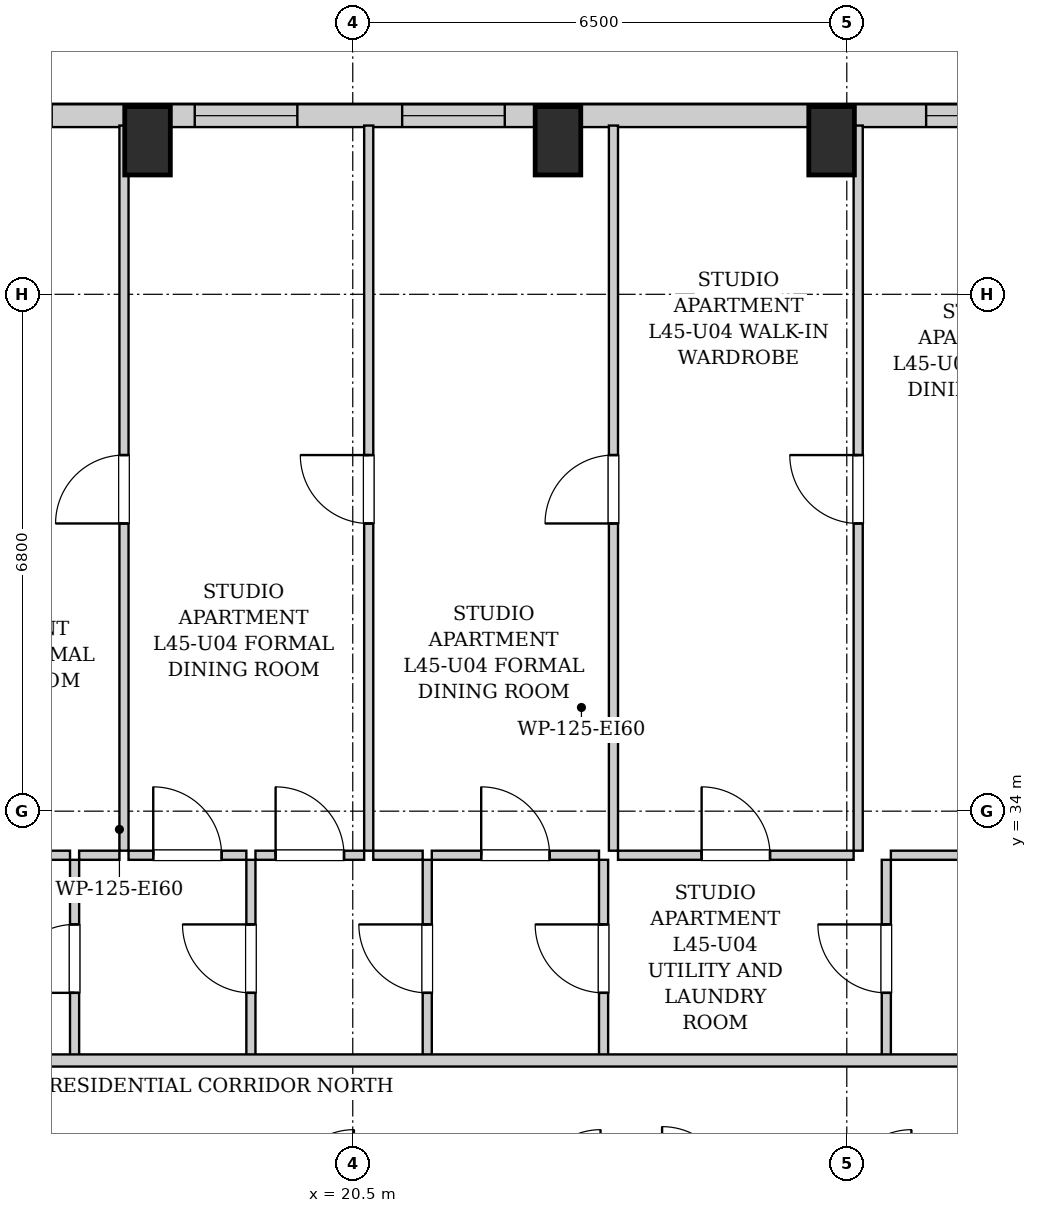
"""IFC4 building model, lengths in metres.
Left out: names, types, materials, properties, quantities, classifications, styles, units other than length and angle.
Written with IfcOpenShell. Run it as: python <this file> out.ifc"""

import sys

from ifc_helpers import new_model, si_unit, direction, frame, frame_2d, origin, origin_2d, place, context, subcontext, project, spatial, rectangle, extrude, element, fill, save


model = new_model("IFC4")
c1 = context("Model", 3, precision=1e-05, world=origin(), true_north=direction((0.0, 1.0)))
c2 = subcontext(c1, "Body", "Model", "MODEL_VIEW")
j1 = project(units=[si_unit("LENGTHUNIT", "METRE"), si_unit("PLANEANGLEUNIT", "RADIAN")], contexts=[c1])
p1 = place(None, origin())
s1 = spatial("IfcSite", under=j1, at=p1, CompositionType="ELEMENT")
p2 = place(p1, origin())
s2 = spatial("IfcBuilding", under=s1, at=p2, CompositionType="ELEMENT")
p3 = place(p2, frame((0.0, 0.0, 156.9)))
s3 = spatial("IfcBuildingStorey", under=s2, at=p3, CompositionType="ELEMENT", Elevation=156.9)
for number, where, z_axis, x_axis in (
    (1, (17.8, 42.82, 0.0), (0.0, 0.0, 1.0), (1.0, 0.0, 0.0)),
    (2, (23.2, 42.82, 0.0), (0.0, 0.0, 1.0), (1.0, 0.0, 0.0)),
    (3, (26.8, 42.82, 0.0), (0.0, 0.0, 1.0), (1.0, 0.0, 0.0)),
):
    element("IfcColumn", number, at=place(p3, frame(where, z_axis=z_axis, x_axis=x_axis)), inside=s3, PredefinedType="COLUMN", context=c2, shape_type="SweptSolid", body=[
        extrude(rectangle(XDim=0.6, YDim=0.9, at=origin_2d()), origin(), (0.0, 0.0, 1.0), 3.25),
    ])
p4 = place(p3, frame((10.0, 43.15, 0.0), z_axis=(0.0, 0.0, 1.0), x_axis=(1.0, 0.0, 0.0)))
e4 = element("IfcWall", 4, at=p4, inside=s3, PredefinedType="SOLIDWALL", context=c2, shape_type="SweptSolid", body=[
    extrude(rectangle(XDim=21.35, YDim=0.3, at=frame_2d((10.675, 0.0))), origin(), (0.0, 0.0, 1.0), 2.99),
])
p5 = place(p4, frame((1.956, 0.0, 0.55)))
e5 = element("IfcOpeningElement", 5, at=p5, cuts=e4, PredefinedType="OPENING", context=c2, shape_type="SweptSolid", body=[
    extrude(rectangle(XDim=1.35, YDim=1.2, at=frame_2d((0.675, 0.6))), frame((0.0, 0.16, 0.0), z_axis=(0.0, -1.0, 0.0), x_axis=(1.0, 0.0, 0.0)), (0.0, 0.0, 1.0), 0.32),
])
p6 = place(p4, frame((5.189, 0.0, 0.55)))
e6 = element("IfcOpeningElement", 6, at=p6, cuts=e4, PredefinedType="OPENING", context=c2, shape_type="SweptSolid", body=[
    extrude(rectangle(XDim=1.35, YDim=1.2, at=frame_2d((0.675, 0.6))), frame((0.0, 0.16, 0.0), z_axis=(0.0, -1.0, 0.0), x_axis=(1.0, 0.0, 0.0)), (0.0, 0.0, 1.0), 0.32),
])
p7 = place(p4, frame((8.421, 0.0, 0.55)))
e7 = element("IfcOpeningElement", 7, at=p7, cuts=e4, PredefinedType="OPENING", context=c2, shape_type="SweptSolid", body=[
    extrude(rectangle(XDim=1.35, YDim=1.2, at=frame_2d((0.675, 0.6))), frame((0.0, 0.16, 0.0), z_axis=(0.0, -1.0, 0.0), x_axis=(1.0, 0.0, 0.0)), (0.0, 0.0, 1.0), 0.32),
])
p8 = place(p4, frame((11.15, 0.0, 0.55)))
e8 = element("IfcOpeningElement", 8, at=p8, cuts=e4, PredefinedType="OPENING", context=c2, shape_type="SweptSolid", body=[
    extrude(rectangle(XDim=1.35, YDim=1.2, at=frame_2d((0.675, 0.6))), frame((0.0, 0.16, 0.0), z_axis=(0.0, -1.0, 0.0), x_axis=(1.0, 0.0, 0.0)), (0.0, 0.0, 1.0), 0.32),
])
p9 = place(p4, frame((18.044, 0.0, 0.55)))
e9 = element("IfcOpeningElement", 9, at=p9, cuts=e4, PredefinedType="OPENING", context=c2, shape_type="SweptSolid", body=[
    extrude(rectangle(XDim=1.35, YDim=1.2, at=frame_2d((0.675, 0.6))), frame((0.0, 0.16, 0.0), z_axis=(0.0, -1.0, 0.0), x_axis=(1.0, 0.0, 0.0)), (0.0, 0.0, 1.0), 0.32),
])
p10 = place(p3, frame((16.84, 30.76, 0.0), z_axis=(0.0, 0.0, 1.0), x_axis=(0.0, 1.0, 0.0)))
e10 = element("IfcWall", 10, at=p10, inside=s3, PredefinedType="PARTITIONING", context=c2, shape_type="SweptSolid", body=[
    extrude(rectangle(XDim=2.6, YDim=0.12, at=frame_2d((1.3, 0.0))), origin(), (0.0, 0.0, 1.0), 2.99),
])
p11 = place(p10, frame((0.85, 0.0, 0.0)))
e11 = element("IfcOpeningElement", 11, at=p11, cuts=e10, PredefinedType="OPENING", context=c2, shape_type="SweptSolid", body=[
    extrude(rectangle(XDim=0.9, YDim=2.05, at=frame_2d((0.45, 1.025))), frame((0.0, 0.07, 0.0), z_axis=(0.0, -1.0, 0.0), x_axis=(1.0, 0.0, 0.0)), (0.0, 0.0, 1.0), 0.14),
])
p12 = place(p3, frame((14.33, 33.42, 0.0), z_axis=(0.0, 0.0, 1.0), x_axis=(1.0, 0.0, 0.0)))
e12 = element("IfcWall", 12, at=p12, inside=s3, PredefinedType="PARTITIONING", context=c2, shape_type="SweptSolid", body=[
    extrude(rectangle(XDim=2.45, YDim=0.12, at=frame_2d((1.225, 0.0))), origin(), (0.0, 0.0, 1.0), 2.99),
])
p13 = place(p12, frame((0.775, 0.0, 0.0)))
e13 = element("IfcOpeningElement", 13, at=p13, cuts=e12, PredefinedType="OPENING", context=c2, shape_type="SweptSolid", body=[
    extrude(rectangle(XDim=0.9, YDim=2.05, at=frame_2d((0.45, 1.025))), frame((0.0, 0.07, 0.0), z_axis=(0.0, -1.0, 0.0), x_axis=(1.0, 0.0, 0.0)), (0.0, 0.0, 1.0), 0.14),
])
p14 = place(p3, frame((19.16, 30.76, 0.0), z_axis=(0.0, 0.0, 1.0), x_axis=(0.0, 1.0, 0.0)))
e14 = element("IfcWall", 14, at=p14, inside=s3, PredefinedType="PARTITIONING", context=c2, shape_type="SweptSolid", body=[
    extrude(rectangle(XDim=2.6, YDim=0.12, at=frame_2d((1.3, 0.0))), origin(), (0.0, 0.0, 1.0), 2.99),
])
p15 = place(p14, frame((0.85, 0.0, 0.0)))
e15 = element("IfcOpeningElement", 15, at=p15, cuts=e14, PredefinedType="OPENING", context=c2, shape_type="SweptSolid", body=[
    extrude(rectangle(XDim=0.9, YDim=2.05, at=frame_2d((0.45, 1.025))), frame((0.0, 0.07, 0.0), z_axis=(0.0, -1.0, 0.0), x_axis=(1.0, 0.0, 0.0)), (0.0, 0.0, 1.0), 0.14),
])
p16 = place(p3, frame((16.9, 33.42, 0.0), z_axis=(0.0, 0.0, 1.0), x_axis=(1.0, 0.0, 0.0)))
e16 = element("IfcWall", 16, at=p16, inside=s3, PredefinedType="PARTITIONING", context=c2, shape_type="SweptSolid", body=[
    extrude(rectangle(XDim=0.53, YDim=0.12, at=frame_2d((0.265, 0.0))), origin(), (0.0, 0.0, 1.0), 2.99),
])
p17 = place(p3, frame((17.55, 33.42, 0.0), z_axis=(0.0, 0.0, 1.0), x_axis=(1.0, 0.0, 0.0)))
e17 = element("IfcWall", 17, at=p17, inside=s3, PredefinedType="PARTITIONING", context=c2, shape_type="SweptSolid", body=[
    extrude(rectangle(XDim=1.55, YDim=0.12, at=frame_2d((0.775, 0.0))), origin(), (0.0, 0.0, 1.0), 2.99),
])
p18 = place(p17, frame((0.325, 0.0, 0.0)))
e18 = element("IfcOpeningElement", 18, at=p18, cuts=e17, PredefinedType="OPENING", context=c2, shape_type="SweptSolid", body=[
    extrude(rectangle(XDim=0.9, YDim=2.05, at=frame_2d((0.45, 1.025))), frame((0.0, 0.07, 0.0), z_axis=(0.0, -1.0, 0.0), x_axis=(1.0, 0.0, 0.0)), (0.0, 0.0, 1.0), 0.14),
])
p19 = place(p3, frame((21.48, 30.76, 0.0), z_axis=(0.0, 0.0, 1.0), x_axis=(0.0, 1.0, 0.0)))
e19 = element("IfcWall", 19, at=p19, inside=s3, PredefinedType="PARTITIONING", context=c2, shape_type="SweptSolid", body=[
    extrude(rectangle(XDim=2.6, YDim=0.12, at=frame_2d((1.3, 0.0))), origin(), (0.0, 0.0, 1.0), 2.99),
])
p20 = place(p19, frame((0.85, 0.0, 0.0)))
e20 = element("IfcOpeningElement", 20, at=p20, cuts=e19, PredefinedType="OPENING", context=c2, shape_type="SweptSolid", body=[
    extrude(rectangle(XDim=0.9, YDim=2.05, at=frame_2d((0.45, 1.025))), frame((0.0, 0.07, 0.0), z_axis=(0.0, -1.0, 0.0), x_axis=(1.0, 0.0, 0.0)), (0.0, 0.0, 1.0), 0.14),
])
p21 = place(p3, frame((19.22, 33.42, 0.0), z_axis=(0.0, 0.0, 1.0), x_axis=(1.0, 0.0, 0.0)))
e21 = element("IfcWall", 21, at=p21, inside=s3, PredefinedType="PARTITIONING", context=c2, shape_type="SweptSolid", body=[
    extrude(rectangle(XDim=1.43, YDim=0.12, at=frame_2d((0.715, 0.0))), origin(), (0.0, 0.0, 1.0), 2.99),
])
p22 = place(p21, frame((0.265, 0.0, 0.0)))
e22 = element("IfcOpeningElement", 22, at=p22, cuts=e21, PredefinedType="OPENING", context=c2, shape_type="SweptSolid", body=[
    extrude(rectangle(XDim=0.9, YDim=2.05, at=frame_2d((0.45, 1.025))), frame((0.0, 0.07, 0.0), z_axis=(0.0, -1.0, 0.0), x_axis=(1.0, 0.0, 0.0)), (0.0, 0.0, 1.0), 0.14),
])
p23 = place(p3, frame((20.77, 33.42, 0.0), z_axis=(0.0, 0.0, 1.0), x_axis=(1.0, 0.0, 0.0)))
e23 = element("IfcWall", 23, at=p23, inside=s3, PredefinedType="PARTITIONING", context=c2, shape_type="SweptSolid", body=[
    extrude(rectangle(XDim=0.65, YDim=0.12, at=frame_2d((0.325, 0.0))), origin(), (0.0, 0.0, 1.0), 2.99),
])
p24 = place(p3, frame((23.8, 30.76, 0.0), z_axis=(0.0, 0.0, 1.0), x_axis=(0.0, 1.0, 0.0)))
e24 = element("IfcWall", 24, at=p24, inside=s3, PredefinedType="PARTITIONING", context=c2, shape_type="SweptSolid", body=[
    extrude(rectangle(XDim=2.6, YDim=0.12, at=frame_2d((1.3, 0.0))), origin(), (0.0, 0.0, 1.0), 2.99),
])
p25 = place(p24, frame((0.85, 0.0, 0.0)))
e25 = element("IfcOpeningElement", 25, at=p25, cuts=e24, PredefinedType="OPENING", context=c2, shape_type="SweptSolid", body=[
    extrude(rectangle(XDim=0.9, YDim=2.05, at=frame_2d((0.45, 1.025))), frame((0.0, 0.07, 0.0), z_axis=(0.0, -1.0, 0.0), x_axis=(1.0, 0.0, 0.0)), (0.0, 0.0, 1.0), 0.14),
])
p26 = place(p3, frame((21.54, 33.42, 0.0), z_axis=(0.0, 0.0, 1.0), x_axis=(1.0, 0.0, 0.0)))
e26 = element("IfcWall", 26, at=p26, inside=s3, PredefinedType="PARTITIONING", context=c2, shape_type="SweptSolid", body=[
    extrude(rectangle(XDim=2.2, YDim=0.12, at=frame_2d((1.1, 0.0))), origin(), (0.0, 0.0, 1.0), 2.99),
])
p27 = place(p26, frame((0.65, 0.0, 0.0)))
e27 = element("IfcOpeningElement", 27, at=p27, cuts=e26, PredefinedType="OPENING", context=c2, shape_type="SweptSolid", body=[
    extrude(rectangle(XDim=0.9, YDim=2.05, at=frame_2d((0.45, 1.025))), frame((0.0, 0.07, 0.0), z_axis=(0.0, -1.0, 0.0), x_axis=(1.0, 0.0, 0.0)), (0.0, 0.0, 1.0), 0.14),
])
p28 = place(p3, frame((27.52, 30.76, 0.0), z_axis=(0.0, 0.0, 1.0), x_axis=(0.0, 1.0, 0.0)))
e28 = element("IfcWall", 28, at=p28, inside=s3, PredefinedType="PARTITIONING", context=c2, shape_type="SweptSolid", body=[
    extrude(rectangle(XDim=2.6, YDim=0.12, at=frame_2d((1.3, 0.0))), origin(), (0.0, 0.0, 1.0), 2.99),
])
p29 = place(p28, frame((0.85, 0.0, 0.0)))
e29 = element("IfcOpeningElement", 29, at=p29, cuts=e28, PredefinedType="OPENING", context=c2, shape_type="SweptSolid", body=[
    extrude(rectangle(XDim=0.9, YDim=2.05, at=frame_2d((0.45, 1.025))), frame((0.0, 0.07, 0.0), z_axis=(0.0, -1.0, 0.0), x_axis=(1.0, 0.0, 0.0)), (0.0, 0.0, 1.0), 0.14),
])
p30 = place(p3, frame((23.99, 33.42, 0.0), z_axis=(0.0, 0.0, 1.0), x_axis=(1.0, 0.0, 0.0)))
e30 = element("IfcWall", 30, at=p30, inside=s3, PredefinedType="PARTITIONING", context=c2, shape_type="SweptSolid", body=[
    extrude(rectangle(XDim=3.1, YDim=0.12, at=frame_2d((1.55, 0.0))), origin(), (0.0, 0.0, 1.0), 2.99),
])
p31 = place(p30, frame((1.1, 0.0, 0.0)))
e31 = element("IfcOpeningElement", 31, at=p31, cuts=e30, PredefinedType="OPENING", context=c2, shape_type="SweptSolid", body=[
    extrude(rectangle(XDim=0.9, YDim=2.05, at=frame_2d((0.45, 1.025))), frame((0.0, 0.07, 0.0), z_axis=(0.0, -1.0, 0.0), x_axis=(1.0, 0.0, 0.0)), (0.0, 0.0, 1.0), 0.14),
])
p32 = place(p3, frame((27.58, 33.42, 0.0), z_axis=(0.0, 0.0, 1.0), x_axis=(1.0, 0.0, 0.0)))
e32 = element("IfcWall", 32, at=p32, inside=s3, PredefinedType="PARTITIONING", context=c2, shape_type="SweptSolid", body=[
    extrude(rectangle(XDim=2.73, YDim=0.12, at=frame_2d((1.365, 0.0))), origin(), (0.0, 0.0, 1.0), 2.99),
])
p33 = place(p32, frame((0.915, 0.0, 0.0)))
e33 = element("IfcOpeningElement", 33, at=p33, cuts=e32, PredefinedType="OPENING", context=c2, shape_type="SweptSolid", body=[
    extrude(rectangle(XDim=0.9, YDim=2.05, at=frame_2d((0.45, 1.025))), frame((0.0, 0.07, 0.0), z_axis=(0.0, -1.0, 0.0), x_axis=(1.0, 0.0, 0.0)), (0.0, 0.0, 1.0), 0.14),
])
p34 = place(p3, frame((17.49, 33.48, 0.0), z_axis=(0.0, 0.0, 1.0), x_axis=(0.0, 1.0, 0.0)))
e34 = element("IfcWall", 34, at=p34, inside=s3, PredefinedType="PARTITIONING", context=c2, shape_type="SweptSolid", body=[
    extrude(rectangle(XDim=9.54, YDim=0.12, at=frame_2d((4.77, 0.0))), origin(), (0.0, 0.0, 1.0), 2.99),
])
p35 = place(p34, frame((4.305, 0.0, 0.0)))
e35 = element("IfcOpeningElement", 35, at=p35, cuts=e34, PredefinedType="OPENING", context=c2, shape_type="SweptSolid", body=[
    extrude(rectangle(XDim=0.9, YDim=2.05, at=frame_2d((0.45, 1.025))), frame((0.0, 0.07, 0.0), z_axis=(0.0, -1.0, 0.0), x_axis=(1.0, 0.0, 0.0)), (0.0, 0.0, 1.0), 0.14),
])
p36 = place(p3, frame((20.71, 33.48, 0.0), z_axis=(0.0, 0.0, 1.0), x_axis=(0.0, 1.0, 0.0)))
e36 = element("IfcWall", 36, at=p36, inside=s3, PredefinedType="PARTITIONING", context=c2, shape_type="SweptSolid", body=[
    extrude(rectangle(XDim=9.54, YDim=0.12, at=frame_2d((4.77, 0.0))), origin(), (0.0, 0.0, 1.0), 2.99),
])
p37 = place(p36, frame((4.305, 0.0, 0.0)))
e37 = element("IfcOpeningElement", 37, at=p37, cuts=e36, PredefinedType="OPENING", context=c2, shape_type="SweptSolid", body=[
    extrude(rectangle(XDim=0.9, YDim=2.05, at=frame_2d((0.45, 1.025))), frame((0.0, 0.07, 0.0), z_axis=(0.0, -1.0, 0.0), x_axis=(1.0, 0.0, 0.0)), (0.0, 0.0, 1.0), 0.14),
])
p38 = place(p3, frame((23.93, 33.48, 0.0), z_axis=(0.0, 0.0, 1.0), x_axis=(0.0, 1.0, 0.0)))
e38 = element("IfcWall", 38, at=p38, inside=s3, PredefinedType="PARTITIONING", context=c2, shape_type="SweptSolid", body=[
    extrude(rectangle(XDim=9.54, YDim=0.12, at=frame_2d((4.77, 0.0))), origin(), (0.0, 0.0, 1.0), 2.99),
])
p39 = place(p38, frame((4.305, 0.0, 0.0)))
e39 = element("IfcOpeningElement", 39, at=p39, cuts=e38, PredefinedType="OPENING", context=c2, shape_type="SweptSolid", body=[
    extrude(rectangle(XDim=0.9, YDim=2.05, at=frame_2d((0.45, 1.025))), frame((0.0, 0.07, 0.0), z_axis=(0.0, -1.0, 0.0), x_axis=(1.0, 0.0, 0.0)), (0.0, 0.0, 1.0), 0.14),
])
p40 = place(p3, frame((27.15, 33.48, 0.0), z_axis=(0.0, 0.0, 1.0), x_axis=(0.0, 1.0, 0.0)))
e40 = element("IfcWall", 40, at=p40, inside=s3, PredefinedType="PARTITIONING", context=c2, shape_type="SweptSolid", body=[
    extrude(rectangle(XDim=9.54, YDim=0.12, at=frame_2d((4.77, 0.0))), origin(), (0.0, 0.0, 1.0), 2.99),
])
p41 = place(p40, frame((4.305, 0.0, 0.0)))
e41 = element("IfcOpeningElement", 41, at=p41, cuts=e40, PredefinedType="OPENING", context=c2, shape_type="SweptSolid", body=[
    extrude(rectangle(XDim=0.9, YDim=2.05, at=frame_2d((0.45, 1.025))), frame((0.0, 0.07, 0.0), z_axis=(0.0, -1.0, 0.0), x_axis=(1.0, 0.0, 0.0)), (0.0, 0.0, 1.0), 0.14),
])
p42 = place(p3, frame((10.05, 30.72, 0.0), z_axis=(0.0, 0.0, 1.0), x_axis=(1.0, 0.0, 0.0)))
e42 = element("IfcWall", 42, at=p42, inside=s3, PredefinedType="PARTITIONING", context=c2, shape_type="SweptSolid", body=[
    extrude(rectangle(XDim=27.7, YDim=0.16, at=frame_2d((13.85, 0.0))), origin(), (0.0, 0.0, 1.0), 2.99),
])
p43 = place(p42, frame((4.165, 0.0, 0.0)))
e43 = element("IfcOpeningElement", 43, at=p43, cuts=e42, PredefinedType="OPENING", context=c2, shape_type="SweptSolid", body=[
    extrude(rectangle(XDim=0.95, YDim=2.1, at=frame_2d((0.475, 1.05))), frame((0.0, 0.09, 0.0), z_axis=(0.0, -1.0, 0.0), x_axis=(1.0, 0.0, 0.0)), (0.0, 0.0, 1.0), 0.18),
])
p44 = place(p11, origin())
e44 = element("IfcDoor", 44, at=p44, inside=s3, OperationType="SINGLE_SWING_LEFT", PredefinedType="DOOR", context=c2, shape_type="SweptSolid", body=[
    extrude(rectangle(XDim=0.9, YDim=2.05, at=frame_2d((0.45, 1.025))), frame((0.0, 0.025, 0.0), z_axis=(0.0, -1.0, 0.0), x_axis=(1.0, 0.0, 0.0)), (0.0, 0.0, 1.0), 0.05),
])
fill(e11, e44)
p45 = place(p15, origin())
e45 = element("IfcDoor", 45, at=p45, inside=s3, OperationType="SINGLE_SWING_RIGHT", PredefinedType="DOOR", context=c2, shape_type="SweptSolid", body=[
    extrude(rectangle(XDim=0.9, YDim=2.05, at=frame_2d((0.45, 1.025))), frame((0.0, 0.025, 0.0), z_axis=(0.0, -1.0, 0.0), x_axis=(1.0, 0.0, 0.0)), (0.0, 0.0, 1.0), 0.05),
])
fill(e15, e45)
p46 = place(p18, origin())
e46 = element("IfcDoor", 46, at=p46, inside=s3, OperationType="SINGLE_SWING_LEFT", PredefinedType="DOOR", context=c2, shape_type="SweptSolid", body=[
    extrude(rectangle(XDim=0.9, YDim=2.05, at=frame_2d((0.45, 1.025))), frame((0.0, 0.025, 0.0), z_axis=(0.0, -1.0, 0.0), x_axis=(1.0, 0.0, 0.0)), (0.0, 0.0, 1.0), 0.05),
])
fill(e18, e46)
p47 = place(p20, origin())
e47 = element("IfcDoor", 47, at=p47, inside=s3, OperationType="SINGLE_SWING_RIGHT", PredefinedType="DOOR", context=c2, shape_type="SweptSolid", body=[
    extrude(rectangle(XDim=0.9, YDim=2.05, at=frame_2d((0.45, 1.025))), frame((0.0, 0.025, 0.0), z_axis=(0.0, -1.0, 0.0), x_axis=(1.0, 0.0, 0.0)), (0.0, 0.0, 1.0), 0.05),
])
fill(e20, e47)
p48 = place(p22, origin())
e48 = element("IfcDoor", 48, at=p48, inside=s3, OperationType="SINGLE_SWING_LEFT", PredefinedType="DOOR", context=c2, shape_type="SweptSolid", body=[
    extrude(rectangle(XDim=0.9, YDim=2.05, at=frame_2d((0.45, 1.025))), frame((0.0, 0.025, 0.0), z_axis=(0.0, -1.0, 0.0), x_axis=(1.0, 0.0, 0.0)), (0.0, 0.0, 1.0), 0.05),
])
fill(e22, e48)
p49 = place(p25, origin())
e49 = element("IfcDoor", 49, at=p49, inside=s3, OperationType="SINGLE_SWING_RIGHT", PredefinedType="DOOR", context=c2, shape_type="SweptSolid", body=[
    extrude(rectangle(XDim=0.9, YDim=2.05, at=frame_2d((0.45, 1.025))), frame((0.0, 0.025, 0.0), z_axis=(0.0, -1.0, 0.0), x_axis=(1.0, 0.0, 0.0)), (0.0, 0.0, 1.0), 0.05),
])
fill(e25, e49)
p50 = place(p27, origin())
e50 = element("IfcDoor", 50, at=p50, inside=s3, OperationType="SINGLE_SWING_LEFT", PredefinedType="DOOR", context=c2, shape_type="SweptSolid", body=[
    extrude(rectangle(XDim=0.9, YDim=2.05, at=frame_2d((0.45, 1.025))), frame((0.0, 0.025, 0.0), z_axis=(0.0, -1.0, 0.0), x_axis=(1.0, 0.0, 0.0)), (0.0, 0.0, 1.0), 0.05),
])
fill(e27, e50)
p51 = place(p29, origin())
e51 = element("IfcDoor", 51, at=p51, inside=s3, OperationType="SINGLE_SWING_RIGHT", PredefinedType="DOOR", context=c2, shape_type="SweptSolid", body=[
    extrude(rectangle(XDim=0.9, YDim=2.05, at=frame_2d((0.45, 1.025))), frame((0.0, 0.025, 0.0), z_axis=(0.0, -1.0, 0.0), x_axis=(1.0, 0.0, 0.0)), (0.0, 0.0, 1.0), 0.05),
])
fill(e29, e51)
p52 = place(p31, origin())
e52 = element("IfcDoor", 52, at=p52, inside=s3, OperationType="SINGLE_SWING_LEFT", PredefinedType="DOOR", context=c2, shape_type="SweptSolid", body=[
    extrude(rectangle(XDim=0.9, YDim=2.05, at=frame_2d((0.45, 1.025))), frame((0.0, 0.025, 0.0), z_axis=(0.0, -1.0, 0.0), x_axis=(1.0, 0.0, 0.0)), (0.0, 0.0, 1.0), 0.05),
])
fill(e31, e52)
p53 = place(p35, origin())
e53 = element("IfcDoor", 53, at=p53, inside=s3, OperationType="SINGLE_SWING_LEFT", PredefinedType="DOOR", context=c2, shape_type="SweptSolid", body=[
    extrude(rectangle(XDim=0.9, YDim=2.05, at=frame_2d((0.45, 1.025))), frame((0.0, 0.025, 0.0), z_axis=(0.0, -1.0, 0.0), x_axis=(1.0, 0.0, 0.0)), (0.0, 0.0, 1.0), 0.05),
])
fill(e35, e53)
p54 = place(p37, origin())
e54 = element("IfcDoor", 54, at=p54, inside=s3, OperationType="SINGLE_SWING_RIGHT", PredefinedType="DOOR", context=c2, shape_type="SweptSolid", body=[
    extrude(rectangle(XDim=0.9, YDim=2.05, at=frame_2d((0.45, 1.025))), frame((0.0, 0.025, 0.0), z_axis=(0.0, -1.0, 0.0), x_axis=(1.0, 0.0, 0.0)), (0.0, 0.0, 1.0), 0.05),
])
fill(e37, e54)
p55 = place(p39, origin())
e55 = element("IfcDoor", 55, at=p55, inside=s3, OperationType="SINGLE_SWING_LEFT", PredefinedType="DOOR", context=c2, shape_type="SweptSolid", body=[
    extrude(rectangle(XDim=0.9, YDim=2.05, at=frame_2d((0.45, 1.025))), frame((0.0, 0.025, 0.0), z_axis=(0.0, -1.0, 0.0), x_axis=(1.0, 0.0, 0.0)), (0.0, 0.0, 1.0), 0.05),
])
fill(e39, e55)
p56 = place(p41, origin())
e56 = element("IfcDoor", 56, at=p56, inside=s3, OperationType="SINGLE_SWING_RIGHT", PredefinedType="DOOR", context=c2, shape_type="SweptSolid", body=[
    extrude(rectangle(XDim=0.9, YDim=2.05, at=frame_2d((0.45, 1.025))), frame((0.0, 0.025, 0.0), z_axis=(0.0, -1.0, 0.0), x_axis=(1.0, 0.0, 0.0)), (0.0, 0.0, 1.0), 0.05),
])
fill(e41, e56)
p57 = place(p7, origin())
e57 = element("IfcWindow", 57, at=p57, inside=s3, PartitioningType="SINGLE_PANEL", PredefinedType="WINDOW", context=c2, shape_type="SweptSolid", body=[
    extrude(rectangle(XDim=1.35, YDim=1.2, at=frame_2d((0.675, 0.6))), frame((0.0, 0.03, 0.0), z_axis=(0.0, -1.0, 0.0), x_axis=(1.0, 0.0, 0.0)), (0.0, 0.0, 1.0), 0.06),
])
fill(e7, e57)
p58 = place(p8, origin())
e58 = element("IfcWindow", 58, at=p58, inside=s3, PartitioningType="SINGLE_PANEL", PredefinedType="WINDOW", context=c2, shape_type="SweptSolid", body=[
    extrude(rectangle(XDim=1.35, YDim=1.2, at=frame_2d((0.675, 0.6))), frame((0.0, 0.03, 0.0), z_axis=(0.0, -1.0, 0.0), x_axis=(1.0, 0.0, 0.0)), (0.0, 0.0, 1.0), 0.06),
])
fill(e8, e58)
p59 = place(p9, origin())
e59 = element("IfcWindow", 59, at=p59, inside=s3, PartitioningType="SINGLE_PANEL", PredefinedType="WINDOW", context=c2, shape_type="SweptSolid", body=[
    extrude(rectangle(XDim=1.35, YDim=1.2, at=frame_2d((0.675, 0.6))), frame((0.0, 0.03, 0.0), z_axis=(0.0, -1.0, 0.0), x_axis=(1.0, 0.0, 0.0)), (0.0, 0.0, 1.0), 0.06),
])
fill(e9, e59)
save(model, sys.argv[1])
